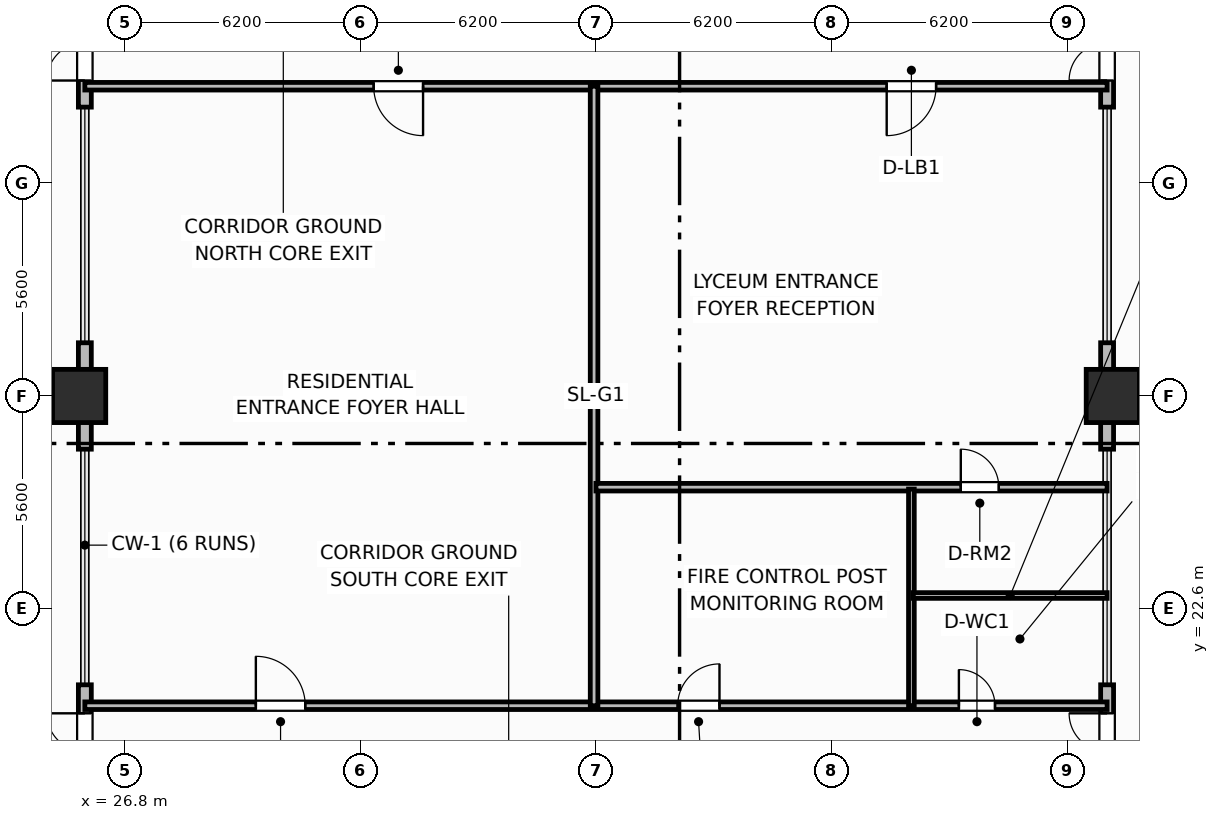
"""IFC4 building model, lengths in metres.
Left out: names, types, materials, properties, quantities, classifications, styles, units other than length and angle.
Written with IfcOpenShell. Run it as: python <this file> out.ifc"""

import sys

from ifc_helpers import new_model, si_unit, direction, frame, frame_2d, origin, origin_2d, place, context, subcontext, project, spatial, rectangle, extrude, element, fill, save


model = new_model("IFC4")
c1 = context("Model", 3, precision=1e-05, world=origin(), true_north=direction((0.0, 1.0)))
c2 = subcontext(c1, "Body", "Model", "MODEL_VIEW")
j1 = project(units=[si_unit("LENGTHUNIT", "METRE"), si_unit("PLANEANGLEUNIT", "RADIAN")], contexts=[c1])
p1 = place(None, origin())
s1 = spatial("IfcSite", under=j1, at=p1, CompositionType="ELEMENT")
p2 = place(p1, origin())
s2 = spatial("IfcBuilding", under=s1, at=p2, CompositionType="ELEMENT")
p3 = place(p2, origin())
s3 = spatial("IfcBuildingStorey", under=s2, at=p3, CompositionType="ELEMENT", Elevation=0.0)
for number, where, z_axis, x_axis in (
    (1, (25.6, 28.2, 0.0), (0.0, 0.0, 1.0), (1.0, 0.0, 0.0)),
    (2, (52.8, 28.2, 0.0), (0.0, 0.0, 1.0), (1.0, 0.0, 0.0)),
):
    element("IfcColumn", number, at=place(p3, frame(where, z_axis=z_axis, x_axis=x_axis)), inside=s3, PredefinedType="COLUMN", context=c2, shape_type="SweptSolid", body=[
        extrude(rectangle(XDim=1.4, YDim=1.4, at=origin_2d()), origin(), (0.0, 0.0, 1.0), 6.6),
    ])
p4 = place(p3, frame((25.75, 17.15, 0.0), z_axis=(0.0, 0.0, 1.0), x_axis=(0.0, 1.0, 0.0)))
e3 = element("IfcWall", 3, at=p4, inside=s3, PredefinedType="SOLIDWALL", context=c2, shape_type="SweptSolid", body=[
    extrude(rectangle(XDim=3.45, YDim=0.34, at=frame_2d((1.725, 0.0))), origin(), (0.0, 0.0, 1.0), 5.58),
])
p5 = place(p4, frame((0.7, 0.0, 0.0)))
e4 = element("IfcOpeningElement", 4, at=p5, cuts=e3, PredefinedType="OPENING", context=c2, shape_type="SweptSolid", body=[
    extrude(rectangle(XDim=2.0, YDim=2.45, at=frame_2d((1.0, 1.225))), frame((0.0, 0.18, 0.0), z_axis=(0.0, -1.0, 0.0), x_axis=(1.0, 0.0, 0.0)), (0.0, 0.0, 1.0), 0.36),
])
p6 = place(p3, frame((25.75, 26.8, 0.0), z_axis=(0.0, 0.0, 1.0), x_axis=(0.0, 1.0, 0.0)))
e5 = element("IfcWall", 5, at=p6, inside=s3, PredefinedType="SOLIDWALL", context=c2, shape_type="SweptSolid", body=[
    extrude(rectangle(XDim=2.8, YDim=0.34, at=frame_2d((1.4, 0.0))), origin(), (0.0, 0.0, 1.0), 5.58),
])
p7 = place(p3, frame((25.75, 35.8, 0.0), z_axis=(0.0, 0.0, 1.0), x_axis=(0.0, 1.0, 0.0)))
e6 = element("IfcWall", 6, at=p7, inside=s3, PredefinedType="SOLIDWALL", context=c2, shape_type="SweptSolid", body=[
    extrude(rectangle(XDim=3.45, YDim=0.34, at=frame_2d((1.725, 0.0))), origin(), (0.0, 0.0, 1.0), 5.58),
])
p8 = place(p7, frame((0.7, 0.0, 0.0)))
e7 = element("IfcOpeningElement", 7, at=p8, cuts=e6, PredefinedType="OPENING", context=c2, shape_type="SweptSolid", body=[
    extrude(rectangle(XDim=2.0, YDim=2.45, at=frame_2d((1.0, 1.225))), frame((0.0, 0.18, 0.0), z_axis=(0.0, -1.0, 0.0), x_axis=(1.0, 0.0, 0.0)), (0.0, 0.0, 1.0), 0.36),
])
p9 = place(p3, frame((52.65, 17.15, 0.0), z_axis=(0.0, 0.0, 1.0), x_axis=(0.0, 1.0, 0.0)))
e8 = element("IfcWall", 8, at=p9, inside=s3, PredefinedType="SOLIDWALL", context=c2, shape_type="SweptSolid", body=[
    extrude(rectangle(XDim=3.45, YDim=0.34, at=frame_2d((1.725, 0.0))), origin(), (0.0, 0.0, 1.0), 5.58),
])
p10 = place(p9, frame((0.7, 0.0, 0.0)))
e9 = element("IfcOpeningElement", 9, at=p10, cuts=e8, PredefinedType="OPENING", context=c2, shape_type="SweptSolid", body=[
    extrude(rectangle(XDim=2.0, YDim=2.45, at=frame_2d((1.0, 1.225))), frame((0.0, 0.18, 0.0), z_axis=(0.0, -1.0, 0.0), x_axis=(1.0, 0.0, 0.0)), (0.0, 0.0, 1.0), 0.36),
])
p11 = place(p3, frame((52.65, 26.8, 0.0), z_axis=(0.0, 0.0, 1.0), x_axis=(0.0, 1.0, 0.0)))
e10 = element("IfcWall", 10, at=p11, inside=s3, PredefinedType="SOLIDWALL", context=c2, shape_type="SweptSolid", body=[
    extrude(rectangle(XDim=2.8, YDim=0.34, at=frame_2d((1.4, 0.0))), origin(), (0.0, 0.0, 1.0), 5.58),
])
p12 = place(p3, frame((52.65, 35.8, 0.0), z_axis=(0.0, 0.0, 1.0), x_axis=(0.0, 1.0, 0.0)))
e11 = element("IfcWall", 11, at=p12, inside=s3, PredefinedType="SOLIDWALL", context=c2, shape_type="SweptSolid", body=[
    extrude(rectangle(XDim=3.45, YDim=0.34, at=frame_2d((1.725, 0.0))), origin(), (0.0, 0.0, 1.0), 5.58),
])
p13 = place(p12, frame((0.7, 0.0, 0.0)))
e12 = element("IfcOpeningElement", 12, at=p13, cuts=e11, PredefinedType="OPENING", context=c2, shape_type="SweptSolid", body=[
    extrude(rectangle(XDim=2.0, YDim=2.45, at=frame_2d((1.0, 1.225))), frame((0.0, 0.18, 0.0), z_axis=(0.0, -1.0, 0.0), x_axis=(1.0, 0.0, 0.0)), (0.0, 0.0, 1.0), 0.36),
])
p14 = place(p3, frame((25.75, 20.05, 0.0), z_axis=(0.0, 0.0, 1.0), x_axis=(1.0, 0.0, 0.0)))
e13 = element("IfcWall", 13, at=p14, inside=s3, PredefinedType="PARTITIONING", context=c2, shape_type="SweptSolid", body=[
    extrude(rectangle(XDim=26.9, YDim=0.2, at=frame_2d((13.45, 0.0))), origin(), (0.0, 0.0, 1.0), 5.52),
])
p15 = place(p14, frame((4.5, 0.0, 0.0)))
e14 = element("IfcOpeningElement", 14, at=p15, cuts=e13, PredefinedType="OPENING", context=c2, shape_type="SweptSolid", body=[
    extrude(rectangle(XDim=1.3, YDim=2.2, at=frame_2d((0.65, 1.1))), frame((0.0, 0.11, 0.0), z_axis=(0.0, -1.0, 0.0), x_axis=(1.0, 0.0, 0.0)), (0.0, 0.0, 1.0), 0.22),
])
p16 = place(p14, frame((15.6, 0.0, 0.0)))
e15 = element("IfcOpeningElement", 15, at=p16, cuts=e13, PredefinedType="OPENING", context=c2, shape_type="SweptSolid", body=[
    extrude(rectangle(XDim=1.1, YDim=2.15, at=frame_2d((0.55, 1.075))), frame((0.0, 0.11, 0.0), z_axis=(0.0, -1.0, 0.0), x_axis=(1.0, 0.0, 0.0)), (0.0, 0.0, 1.0), 0.22),
])
p17 = place(p14, frame((23.0, 0.0, 0.0)))
e16 = element("IfcOpeningElement", 16, at=p17, cuts=e13, PredefinedType="OPENING", context=c2, shape_type="SweptSolid", body=[
    extrude(rectangle(XDim=0.95, YDim=2.1, at=frame_2d((0.475, 1.05))), frame((0.0, 0.11, 0.0), z_axis=(0.0, -1.0, 0.0), x_axis=(1.0, 0.0, 0.0)), (0.0, 0.0, 1.0), 0.22),
])
p18 = place(p3, frame((52.65, 36.35, 0.0), z_axis=(0.0, 0.0, 1.0), x_axis=(-1.0, 0.0, 0.0)))
e17 = element("IfcWall", 17, at=p18, inside=s3, PredefinedType="PARTITIONING", context=c2, shape_type="SweptSolid", body=[
    extrude(rectangle(XDim=26.9, YDim=0.2, at=frame_2d((13.45, 0.0))), origin(), (0.0, 0.0, 1.0), 5.52),
])
p19 = place(p18, frame((4.5, 0.0, 0.0)))
e18 = element("IfcOpeningElement", 18, at=p19, cuts=e17, PredefinedType="OPENING", context=c2, shape_type="SweptSolid", body=[
    extrude(rectangle(XDim=1.3, YDim=2.2, at=frame_2d((0.65, 1.1))), frame((0.0, 0.11, 0.0), z_axis=(0.0, -1.0, 0.0), x_axis=(1.0, 0.0, 0.0)), (0.0, 0.0, 1.0), 0.22),
])
p20 = place(p18, frame((18.0, 0.0, 0.0)))
e19 = element("IfcOpeningElement", 19, at=p20, cuts=e17, PredefinedType="OPENING", context=c2, shape_type="SweptSolid", body=[
    extrude(rectangle(XDim=1.3, YDim=2.2, at=frame_2d((0.65, 1.1))), frame((0.0, 0.11, 0.0), z_axis=(0.0, -1.0, 0.0), x_axis=(1.0, 0.0, 0.0)), (0.0, 0.0, 1.0), 0.22),
])
p21 = place(p3, frame((39.15, 20.05, 0.0), z_axis=(0.0, 0.0, 1.0), x_axis=(0.0, 1.0, 0.0)))
e20 = element("IfcWall", 20, at=p21, inside=s3, PredefinedType="PARTITIONING", context=c2, shape_type="SweptSolid", body=[
    extrude(rectangle(XDim=16.3, YDim=0.2, at=frame_2d((8.15, 0.0))), origin(), (0.0, 0.0, 1.0), 5.52),
])
p22 = place(p3, frame((39.2, 25.8, 0.0), z_axis=(0.0, 0.0, 1.0), x_axis=(1.0, 0.0, 0.0)))
e21 = element("IfcWall", 21, at=p22, inside=s3, PredefinedType="PARTITIONING", context=c2, shape_type="SweptSolid", body=[
    extrude(rectangle(XDim=13.45, YDim=0.2, at=frame_2d((6.725, 0.0))), origin(), (0.0, 0.0, 1.0), 5.52),
])
p23 = place(p22, frame((9.6, 0.0, 0.0)))
e22 = element("IfcOpeningElement", 22, at=p23, cuts=e21, PredefinedType="OPENING", context=c2, shape_type="SweptSolid", body=[
    extrude(rectangle(XDim=1.0, YDim=2.15, at=frame_2d((0.5, 1.075))), frame((0.0, 0.11, 0.0), z_axis=(0.0, -1.0, 0.0), x_axis=(1.0, 0.0, 0.0)), (0.0, 0.0, 1.0), 0.22),
])
p24 = place(p3, frame((47.5, 20.05, 0.0), z_axis=(0.0, 0.0, 1.0), x_axis=(0.0, 1.0, 0.0)))
e23 = element("IfcWall", 23, at=p24, inside=s3, PredefinedType="PARTITIONING", context=c2, shape_type="SweptSolid", body=[
    extrude(rectangle(XDim=5.7, YDim=0.15, at=frame_2d((2.85, 0.0))), origin(), (0.0, 0.0, 1.0), 5.52),
])
p25 = place(p3, frame((47.55, 22.95, 0.0), z_axis=(0.0, 0.0, 1.0), x_axis=(1.0, 0.0, 0.0)))
e24 = element("IfcWall", 24, at=p25, inside=s3, PredefinedType="PARTITIONING", context=c2, shape_type="SweptSolid", body=[
    extrude(rectangle(XDim=5.1, YDim=0.15, at=frame_2d((2.55, 0.0))), origin(), (0.0, 0.0, 1.0), 5.52),
])
p26 = place(p5, origin())
e25 = element("IfcDoor", 25, at=p26, inside=s3, OperationType="DOUBLE_DOOR_SINGLE_SWING", PredefinedType="DOOR", context=c2, shape_type="SweptSolid", body=[
    extrude(rectangle(XDim=2.0, YDim=2.45, at=frame_2d((1.0, 1.225))), frame((0.0, 0.025, 0.0), z_axis=(0.0, -1.0, 0.0), x_axis=(1.0, 0.0, 0.0)), (0.0, 0.0, 1.0), 0.05),
])
fill(e4, e25)
p27 = place(p8, origin())
e26 = element("IfcDoor", 26, at=p27, inside=s3, OperationType="DOUBLE_DOOR_SINGLE_SWING", PredefinedType="DOOR", context=c2, shape_type="SweptSolid", body=[
    extrude(rectangle(XDim=2.0, YDim=2.45, at=frame_2d((1.0, 1.225))), frame((0.0, 0.025, 0.0), z_axis=(0.0, -1.0, 0.0), x_axis=(1.0, 0.0, 0.0)), (0.0, 0.0, 1.0), 0.05),
])
fill(e7, e26)
p28 = place(p10, origin())
e27 = element("IfcDoor", 27, at=p28, inside=s3, OperationType="DOUBLE_DOOR_SINGLE_SWING", PredefinedType="DOOR", context=c2, shape_type="SweptSolid", body=[
    extrude(rectangle(XDim=2.0, YDim=2.45, at=frame_2d((1.0, 1.225))), frame((0.0, 0.025, 0.0), z_axis=(0.0, -1.0, 0.0), x_axis=(1.0, 0.0, 0.0)), (0.0, 0.0, 1.0), 0.05),
])
fill(e9, e27)
p29 = place(p13, origin())
e28 = element("IfcDoor", 28, at=p29, inside=s3, OperationType="DOUBLE_DOOR_SINGLE_SWING", PredefinedType="DOOR", context=c2, shape_type="SweptSolid", body=[
    extrude(rectangle(XDim=2.0, YDim=2.45, at=frame_2d((1.0, 1.225))), frame((0.0, 0.025, 0.0), z_axis=(0.0, -1.0, 0.0), x_axis=(1.0, 0.0, 0.0)), (0.0, 0.0, 1.0), 0.05),
])
fill(e12, e28)
p30 = place(p15, origin())
e29 = element("IfcDoor", 29, at=p30, inside=s3, OperationType="SINGLE_SWING_LEFT", PredefinedType="DOOR", context=c2, shape_type="SweptSolid", body=[
    extrude(rectangle(XDim=1.3, YDim=2.2, at=frame_2d((0.65, 1.1))), frame((0.0, 0.025, 0.0), z_axis=(0.0, -1.0, 0.0), x_axis=(1.0, 0.0, 0.0)), (0.0, 0.0, 1.0), 0.05),
])
fill(e14, e29)
p31 = place(p16, origin())
e30 = element("IfcDoor", 30, at=p31, inside=s3, OperationType="SINGLE_SWING_RIGHT", PredefinedType="DOOR", context=c2, shape_type="SweptSolid", body=[
    extrude(rectangle(XDim=1.1, YDim=2.15, at=frame_2d((0.55, 1.075))), frame((0.0, 0.025, 0.0), z_axis=(0.0, -1.0, 0.0), x_axis=(1.0, 0.0, 0.0)), (0.0, 0.0, 1.0), 0.05),
])
fill(e15, e30)
p32 = place(p17, origin())
e31 = element("IfcDoor", 31, at=p32, inside=s3, OperationType="SINGLE_SWING_LEFT", PredefinedType="DOOR", context=c2, shape_type="SweptSolid", body=[
    extrude(rectangle(XDim=0.95, YDim=2.1, at=frame_2d((0.475, 1.05))), frame((0.0, 0.025, 0.0), z_axis=(0.0, -1.0, 0.0), x_axis=(1.0, 0.0, 0.0)), (0.0, 0.0, 1.0), 0.05),
])
fill(e16, e31)
p33 = place(p19, origin())
e32 = element("IfcDoor", 32, at=p33, inside=s3, OperationType="SINGLE_SWING_RIGHT", PredefinedType="DOOR", context=c2, shape_type="SweptSolid", body=[
    extrude(rectangle(XDim=1.3, YDim=2.2, at=frame_2d((0.65, 1.1))), frame((0.0, 0.025, 0.0), z_axis=(0.0, -1.0, 0.0), x_axis=(1.0, 0.0, 0.0)), (0.0, 0.0, 1.0), 0.05),
])
fill(e18, e32)
p34 = place(p20, origin())
e33 = element("IfcDoor", 33, at=p34, inside=s3, OperationType="SINGLE_SWING_LEFT", PredefinedType="DOOR", context=c2, shape_type="SweptSolid", body=[
    extrude(rectangle(XDim=1.3, YDim=2.2, at=frame_2d((0.65, 1.1))), frame((0.0, 0.025, 0.0), z_axis=(0.0, -1.0, 0.0), x_axis=(1.0, 0.0, 0.0)), (0.0, 0.0, 1.0), 0.05),
])
fill(e19, e33)
p35 = place(p23, origin())
e34 = element("IfcDoor", 34, at=p35, inside=s3, OperationType="SINGLE_SWING_LEFT", PredefinedType="DOOR", context=c2, shape_type="SweptSolid", body=[
    extrude(rectangle(XDim=1.0, YDim=2.15, at=frame_2d((0.5, 1.075))), frame((0.0, 0.025, 0.0), z_axis=(0.0, -1.0, 0.0), x_axis=(1.0, 0.0, 0.0)), (0.0, 0.0, 1.0), 0.05),
])
fill(e22, e34)
save(model, sys.argv[1])
